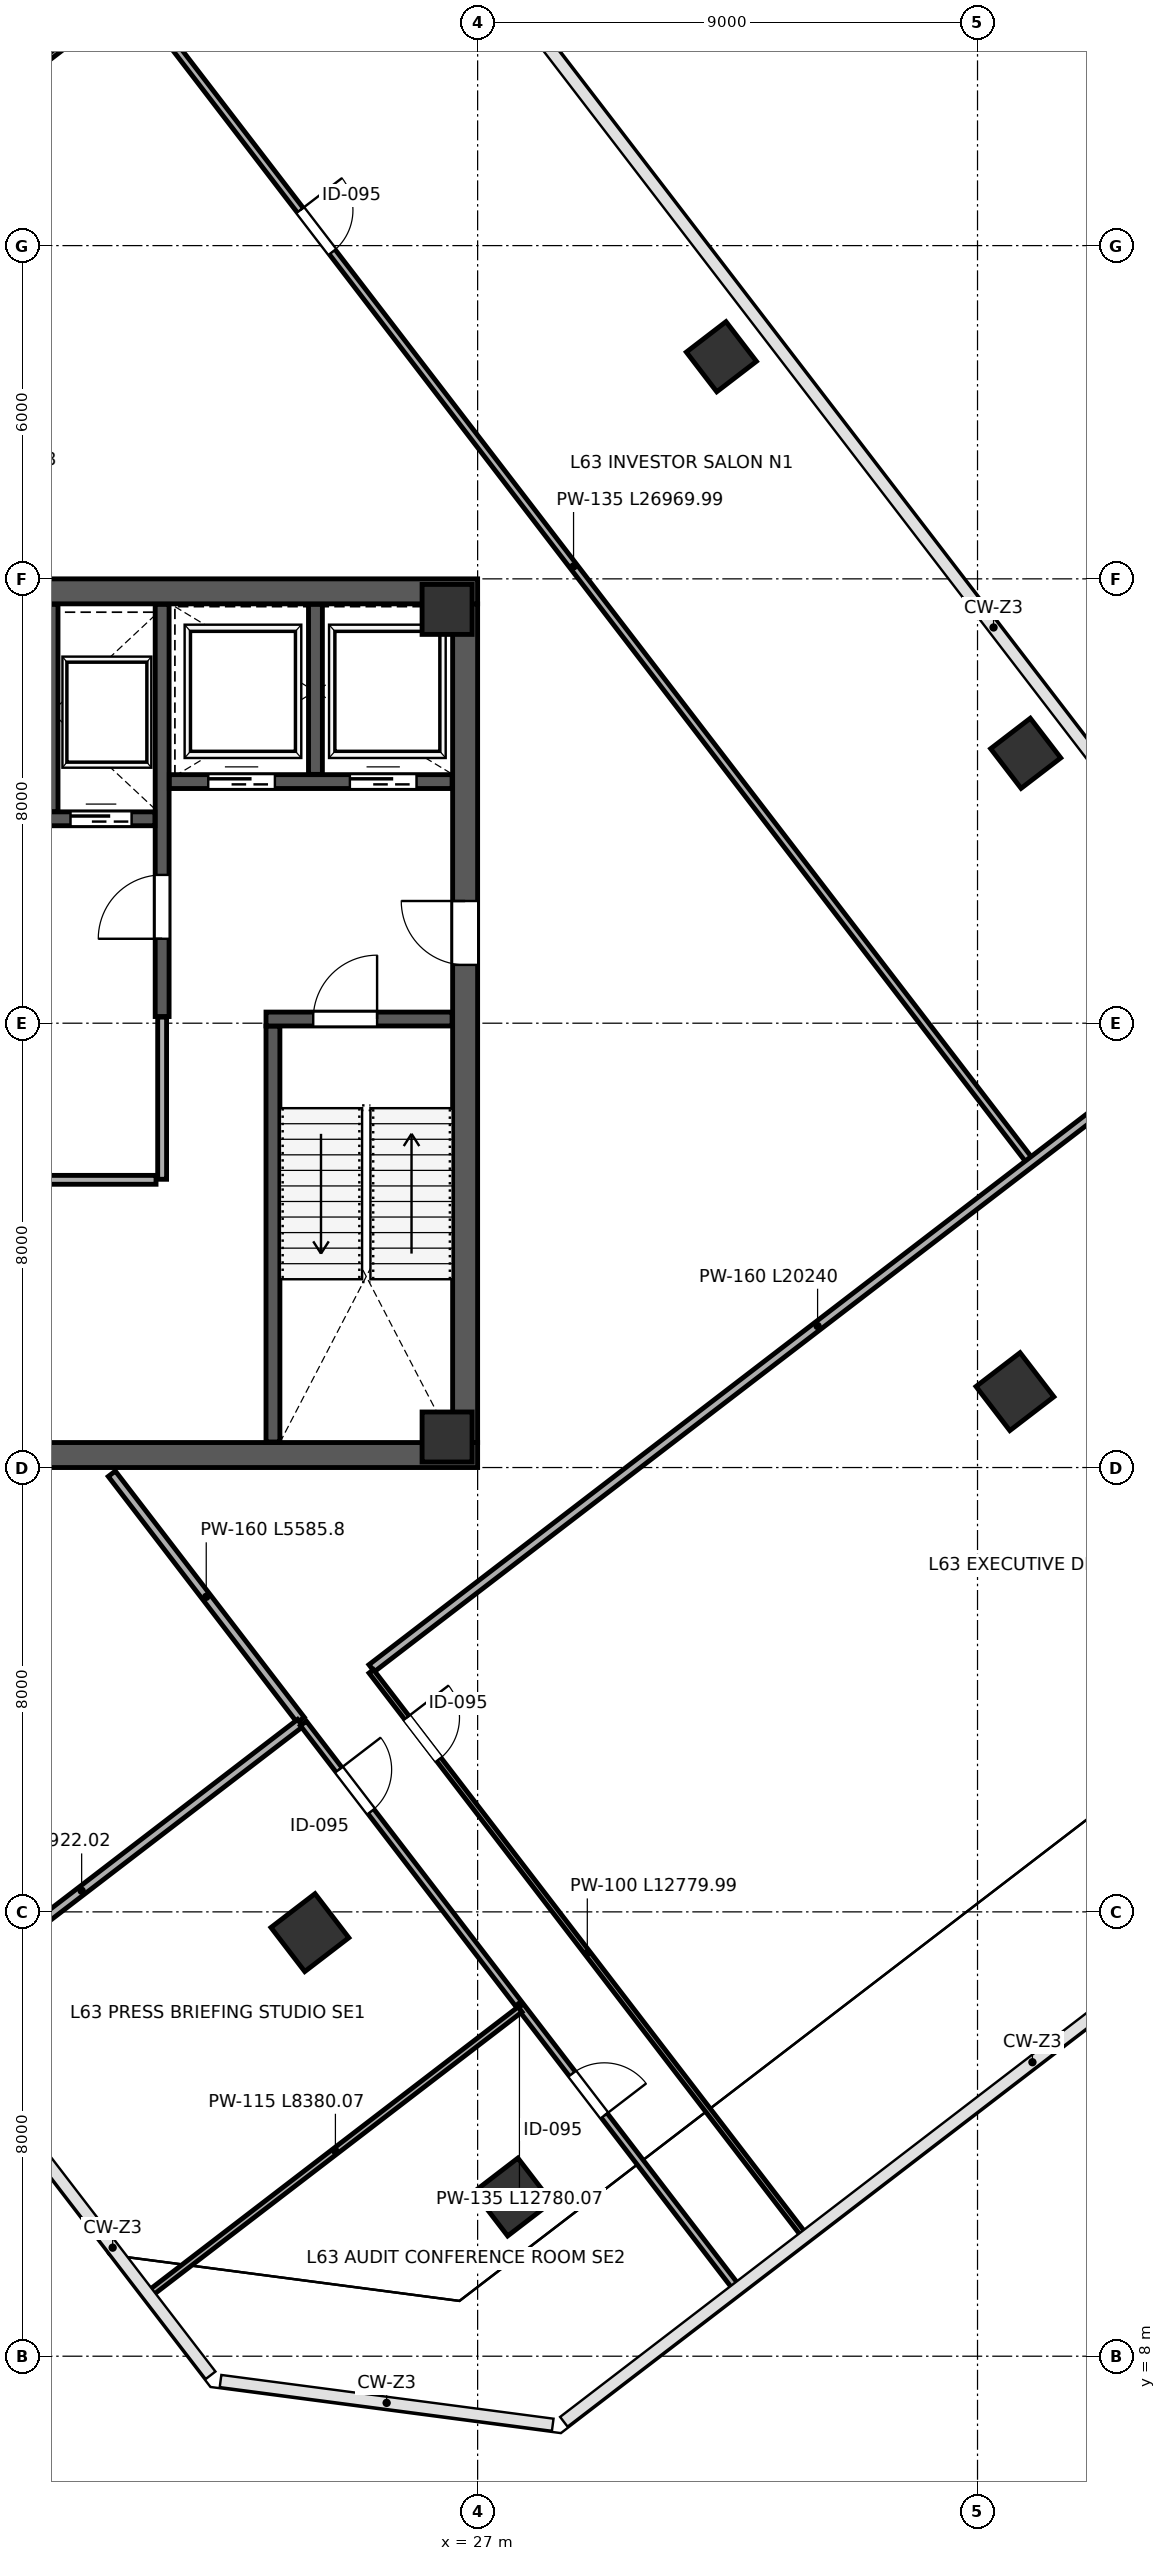
"""IFC4 building model, lengths in metres.
Left out: names, types, materials, properties, quantities, classifications, styles, units other than length and angle.
Written with IfcOpenShell. Run it as: python <this file> out.ifc"""

import sys

from ifc_helpers import new_model, si_unit, direction, frame, frame_2d, origin, origin_2d, place, context, subcontext, project, spatial, rectangle, extrude, source, transform, mapped, element, fill, save


model = new_model("IFC4")
c1 = context("Model", 3, precision=1e-05, world=origin(), true_north=direction((0.0, 1.0)))
c2 = subcontext(c1, "Body", "Model", "MODEL_VIEW")
j1 = project(units=[si_unit("LENGTHUNIT", "METRE"), si_unit("PLANEANGLEUNIT", "RADIAN")], contexts=[c1])
p1 = place(None, origin())
s1 = spatial("IfcSite", under=j1, at=p1, CompositionType="ELEMENT")
p2 = place(p1, origin())
s2 = spatial("IfcBuilding", under=s1, at=p2, CompositionType="ELEMENT")
p3 = place(p2, frame((0.0, 0.0, 279.4)))
s3 = spatial("IfcBuildingStorey", under=s2, at=p3, CompositionType="ELEMENT", Elevation=279.4)
m1 = source(origin(), c2, "Body", "SweptSolid", [
    extrude(rectangle(XDim=0.9, YDim=0.9, at=origin_2d()), origin(), (0.0, 0.0, 1.0), 4.199),
])
for number, where, z_axis, x_axis in (
    (1, (26.45, 24.55, 0.001), (0.0, 0.0, 1.0), (1.0, 0.0, 0.0)),
    (2, (26.45, 39.45, 0.001), (0.0, 0.0, 1.0), (1.0, 0.0, 0.0)),
):
    element("IfcColumn", number, at=place(p3, frame(where, z_axis=z_axis, x_axis=x_axis)), inside=s3, PredefinedType="COLUMN", context=c2, shape_type="MappedRepresentation", body=[
        mapped(m1, transform((0.0, 0.0, 0.0), scale=1.0)),
    ])
m2 = source(origin(), c2, "Body", "SweptSolid", [
    extrude(rectangle(XDim=0.9, YDim=0.9, at=origin_2d()), origin(), (0.0, 0.0, 1.0), 4.199),
])
for number, where, z_axis, x_axis in (
    (3, (31.389, 44.0, 0.001), (0.0, 0.0, 1.0), (-0.609, 0.793, 0.0)),
    (4, (36.867, 36.859, 0.001), (0.0, 0.0, 1.0), (-0.609, 0.793, 0.0)),
):
    element("IfcColumn", number, at=place(p3, frame(where, z_axis=z_axis, x_axis=x_axis)), inside=s3, PredefinedType="COLUMN", context=c2, shape_type="MappedRepresentation", body=[
        mapped(m2, transform((0.0, 0.0, 0.0), scale=1.0)),
    ])
m3 = source(origin(), c2, "Body", "SweptSolid", [
    extrude(rectangle(XDim=1.0, YDim=1.0, at=origin_2d()), origin(), (0.0, 0.0, 1.0), 4.199),
])
for number, where, z_axis, x_axis in (
    (5, (23.98, 15.626, 0.001), (0.0, 0.0, 1.0), (-0.609, 0.793, 0.0)),
    (6, (36.674, 25.366, 0.001), (0.0, 0.0, 1.0), (-0.609, 0.793, 0.0)),
):
    element("IfcColumn", number, at=place(p3, frame(where, z_axis=z_axis, x_axis=x_axis)), inside=s3, PredefinedType="COLUMN", context=c2, shape_type="MappedRepresentation", body=[
        mapped(m3, transform((0.0, 0.0, 0.0), scale=1.0)),
    ])
m4 = source(origin(), c2, "Body", "SweptSolid", [
    extrude(rectangle(XDim=1.0, YDim=1.0, at=origin_2d()), origin(), (0.0, 0.0, 1.0), 4.199),
])
p4 = place(p3, frame((27.633, 10.866, 0.001), z_axis=(0.0, 0.0, 1.0), x_axis=(-0.608761429009, 0.793353340291, 0.0)))
e7 = element("IfcColumn", 7, at=p4, inside=s3, PredefinedType="COLUMN", context=c2, shape_type="MappedRepresentation", body=[
    mapped(m4, transform((0.0, 0.0, 0.0), scale=1.0)),
])
p5 = place(p3, frame((26.775, 24.45, 0.0), z_axis=(0.0, 0.0, 1.0), x_axis=(0.0, 1.0, 0.0)))
e8 = element("IfcWall", 8, at=p5, inside=s3, PredefinedType="SHEAR", context=c2, shape_type="SweptSolid", body=[
    extrude(rectangle(XDim=15.1, YDim=0.45, at=frame_2d((7.55, 0.0))), origin(), (0.0, 0.0, 1.0), 3.96),
])
p6 = place(p5, frame((8.6, 0.0, 0.0)))
e9 = element("IfcOpeningElement", 9, at=p6, cuts=e8, PredefinedType="OPENING", context=c2, shape_type="SweptSolid", body=[
    extrude(rectangle(XDim=1.15, YDim=2.2, at=frame_2d((0.575, 1.1))), frame((0.0, 0.235, 0.0), z_axis=(0.0, -1.0, 0.0), x_axis=(1.0, 0.0, 0.0)), (0.0, 0.0, 1.0), 0.47),
])
for number, where, z_axis, x_axis in (
    (10, (9.0, 24.225, 0.0), (0.0, 0.0, 1.0), (1.0, 0.0, 0.0)),
    (11, (9.0, 39.775, 0.0), (0.0, 0.0, 1.0), (1.0, 0.0, 0.0)),
):
    element("IfcWall", number, at=place(p3, frame(where, z_axis=z_axis, x_axis=x_axis)), inside=s3, PredefinedType="SHEAR", context=c2, shape_type="SweptSolid", body=[
        extrude(rectangle(XDim=18.0, YDim=0.45, at=frame_2d((9.0, 0.0))), origin(), (0.0, 0.0, 1.0), 3.96),
    ])
p7 = place(p3, frame((23.315, 24.46, 0.0), z_axis=(0.0, 0.0, 1.0), x_axis=(0.0, 1.0, 0.0)))
e12 = element("IfcWall", 12, at=p7, inside=s3, PredefinedType="SHEAR", context=c2, shape_type="SweptSolid", body=[
    extrude(rectangle(XDim=7.49, YDim=0.25, at=frame_2d((3.745, 0.0))), origin(), (0.0, 0.0, 1.0), 3.96),
])
p8 = place(p3, frame((23.19, 32.075, 0.0), z_axis=(0.0, 0.0, 1.0), x_axis=(1.0, 0.0, 0.0)))
e13 = element("IfcWall", 13, at=p8, inside=s3, PredefinedType="SHEAR", context=c2, shape_type="SweptSolid", body=[
    extrude(rectangle(XDim=3.35, YDim=0.25, at=frame_2d((1.675, 0.0))), origin(), (0.0, 0.0, 1.0), 3.96),
])
p9 = place(p8, frame((0.85, 0.0, 0.0)))
e14 = element("IfcOpeningElement", 14, at=p9, cuts=e13, PredefinedType="OPENING", context=c2, shape_type="SweptSolid", body=[
    extrude(rectangle(XDim=1.15, YDim=2.2, at=frame_2d((0.575, 1.1))), frame((0.0, 0.135, 0.0), z_axis=(0.0, -1.0, 0.0), x_axis=(1.0, 0.0, 0.0)), (0.0, 0.0, 1.0), 0.27),
])
p10 = place(p3, frame((21.32, 32.12, 0.0), z_axis=(0.0, 0.0, 1.0), x_axis=(0.0, 1.0, 0.0)))
e15 = element("IfcWall", 15, at=p10, inside=s3, PredefinedType="SHEAR", context=c2, shape_type="SweptSolid", body=[
    extrude(rectangle(XDim=7.42, YDim=0.25, at=frame_2d((3.71, 0.0))), origin(), (0.0, 0.0, 1.0), 3.96),
])
p11 = place(p10, frame((1.4, 0.0, 0.0)))
e16 = element("IfcOpeningElement", 16, at=p11, cuts=e15, PredefinedType="OPENING", context=c2, shape_type="SweptSolid", body=[
    extrude(rectangle(XDim=1.15, YDim=2.2, at=frame_2d((0.575, 1.1))), frame((0.0, 0.135, 0.0), z_axis=(0.0, -1.0, 0.0), x_axis=(1.0, 0.0, 0.0)), (0.0, 0.0, 1.0), 0.27),
])
p12 = place(p3, frame((21.45, 36.35, 0.0), z_axis=(0.0, 0.0, 1.0), x_axis=(1.0, 0.0, 0.0)))
e17 = element("IfcWall", 17, at=p12, inside=s3, PredefinedType="SHEAR", context=c2, shape_type="SweptSolid", body=[
    extrude(rectangle(XDim=5.09, YDim=0.25, at=frame_2d((2.545, 0.0))), origin(), (0.0, 0.0, 1.0), 3.96),
])
p13 = place(p12, frame((0.7, 0.0, 0.0)))
e18 = element("IfcOpeningElement", 18, at=p13, cuts=e17, PredefinedType="OPENING", context=c2, shape_type="SweptSolid", body=[
    extrude(rectangle(XDim=1.2, YDim=2.2, at=frame_2d((0.6, 1.1))), frame((0.0, 0.135, 0.0), z_axis=(0.0, -1.0, 0.0), x_axis=(1.0, 0.0, 0.0)), (0.0, 0.0, 1.0), 0.27),
])
p14 = place(p12, frame((3.25, 0.0, 0.0)))
e19 = element("IfcOpeningElement", 19, at=p14, cuts=e17, PredefinedType="OPENING", context=c2, shape_type="SweptSolid", body=[
    extrude(rectangle(XDim=1.2, YDim=2.2, at=frame_2d((0.6, 1.1))), frame((0.0, 0.135, 0.0), z_axis=(0.0, -1.0, 0.0), x_axis=(1.0, 0.0, 0.0)), (0.0, 0.0, 1.0), 0.27),
])
p15 = place(p3, frame((24.08, 36.48, 0.0), z_axis=(0.0, 0.0, 1.0), x_axis=(0.0, 1.0, 0.0)))
e20 = element("IfcWall", 20, at=p15, inside=s3, PredefinedType="SHEAR", context=c2, shape_type="SweptSolid", body=[
    extrude(rectangle(XDim=3.06, YDim=0.25, at=frame_2d((1.53, 0.0))), origin(), (0.0, 0.0, 1.0), 3.96),
])
p16 = place(p3, frame((17.32, 35.68, 0.0), z_axis=(0.0, 0.0, 1.0), x_axis=(1.0, 0.0, 0.0)))
e21 = element("IfcWall", 21, at=p16, inside=s3, PredefinedType="SHEAR", context=c2, shape_type="SweptSolid", body=[
    extrude(rectangle(XDim=3.87, YDim=0.25, at=frame_2d((1.935, 0.0))), origin(), (0.0, 0.0, 1.0), 3.96),
])
p17 = place(p16, frame((0.45, 0.0, 0.0)))
e22 = element("IfcOpeningElement", 22, at=p17, cuts=e21, PredefinedType="OPENING", context=c2, shape_type="SweptSolid", body=[
    extrude(rectangle(XDim=1.1, YDim=2.2, at=frame_2d((0.55, 1.1))), frame((0.0, 0.135, 0.0), z_axis=(0.0, -1.0, 0.0), x_axis=(1.0, 0.0, 0.0)), (0.0, 0.0, 1.0), 0.27),
])
p18 = place(p16, frame((2.35, 0.0, 0.0)))
e23 = element("IfcOpeningElement", 23, at=p18, cuts=e21, PredefinedType="OPENING", context=c2, shape_type="SweptSolid", body=[
    extrude(rectangle(XDim=1.1, YDim=2.2, at=frame_2d((0.55, 1.1))), frame((0.0, 0.135, 0.0), z_axis=(0.0, -1.0, 0.0), x_axis=(1.0, 0.0, 0.0)), (0.0, 0.0, 1.0), 0.27),
])
p19 = place(p3, frame((19.32, 35.81, 0.0), z_axis=(0.0, 0.0, 1.0), x_axis=(0.0, 1.0, 0.0)))
e24 = element("IfcWall", 24, at=p19, inside=s3, PredefinedType="SHEAR", context=c2, shape_type="SweptSolid", body=[
    extrude(rectangle(XDim=3.73, YDim=0.25, at=frame_2d((1.865, 0.0))), origin(), (0.0, 0.0, 1.0), 3.96),
])
p20 = place(p3, frame((12.84, 29.18, 0.0), z_axis=(0.0, 0.0, 1.0), x_axis=(1.0, 0.0, 0.0)))
e25 = element("IfcWall", 25, at=p20, inside=s3, PredefinedType="PARTITIONING", context=c2, shape_type="SweptSolid", body=[
    extrude(rectangle(XDim=8.37, YDim=0.16, at=frame_2d((4.185, 0.0))), origin(), (0.0, 0.0, 1.0), 3.96),
])
p21 = place(p20, frame((2.6, 0.0, 0.0)))
e26 = element("IfcOpeningElement", 26, at=p21, cuts=e25, PredefinedType="OPENING", context=c2, shape_type="SweptSolid", body=[
    extrude(rectangle(XDim=0.9, YDim=2.15, at=frame_2d((0.45, 1.075))), frame((0.0, 0.09, 0.0), z_axis=(0.0, -1.0, 0.0), x_axis=(1.0, 0.0, 0.0)), (0.0, 0.0, 1.0), 0.18),
])
p22 = place(p3, frame((21.32, 29.19, 0.0), z_axis=(0.0, 0.0, 1.0), x_axis=(0.0, 1.0, 0.0)))
e27 = element("IfcWall", 27, at=p22, inside=s3, PredefinedType="PARTITIONING", context=c2, shape_type="SweptSolid", body=[
    extrude(rectangle(XDim=2.92, YDim=0.16, at=frame_2d((1.46, 0.0))), origin(), (0.0, 0.0, 1.0), 3.96),
])
p23 = place(p3, frame((20.414, 23.888, 0.0), z_axis=(0.0, 0.0, 1.0), x_axis=(0.608740736079, -0.793369218106, 0.0)))
e28 = element("IfcWall", 28, at=p23, inside=s3, PredefinedType="PARTITIONING", context=c2, shape_type="SweptSolid", body=[
    extrude(rectangle(XDim=5.585, YDim=0.16, at=frame_2d((2.793, 0.0))), origin(), (0.0, 0.0, 1.0), 3.96),
])
p24 = place(p3, frame((20.518, 50.922, 0.0), z_axis=(0.0, 0.0, 1.0), x_axis=(0.608759693778, -0.793354671778, 0.0)))
e29 = element("IfcWall", 29, at=p24, inside=s3, PredefinedType="PARTITIONING", context=c2, shape_type="SweptSolid", body=[
    extrude(rectangle(XDim=26.97, YDim=0.135, at=frame_2d((13.485, 0.0))), origin(), (0.0, 0.0, 1.0), 3.96),
])
p25 = place(p24, frame((5.4, 0.0, 0.0)))
e30 = element("IfcOpeningElement", 30, at=p25, cuts=e29, PredefinedType="OPENING", context=c2, shape_type="SweptSolid", body=[
    extrude(rectangle(XDim=0.95, YDim=2.15, at=frame_2d((0.475, 1.075))), frame((0.0, 0.078, 0.0), z_axis=(0.0, -1.0, 0.0), x_axis=(1.0, 0.0, 0.0)), (0.0, 0.0, 1.0), 0.155),
])
p26 = place(p3, frame((1.519, 35.764, 0.0), z_axis=(0.0, 0.0, 1.0), x_axis=(0.793353184068, 0.608761632602, 0.0)))
e31 = element("IfcWall", 31, at=p26, inside=s3, PredefinedType="PARTITIONING", context=c2, shape_type="SweptSolid", body=[
    extrude(rectangle(XDim=27.572, YDim=0.1, at=frame_2d((13.786, 0.0))), origin(), (0.0, 0.0, 1.0), 3.96),
])
p27 = place(p3, frame((25.092, 20.387, 0.0), z_axis=(0.0, 0.0, 1.0), x_axis=(0.793357014217, 0.608756641025, 0.0)))
e32 = element("IfcWall", 32, at=p27, inside=s3, PredefinedType="PARTITIONING", context=c2, shape_type="SweptSolid", body=[
    extrude(rectangle(XDim=20.24, YDim=0.16, at=frame_2d((10.12, 0.0))), origin(), (0.0, 0.0, 1.0), 3.195),
])
p28 = place(p3, frame((15.935, 13.361, 0.0), z_axis=(0.0, 0.0, 1.0), x_axis=(0.793355203048, 0.608759001409, 0.0)))
e33 = element("IfcWall", 33, at=p28, inside=s3, PredefinedType="PARTITIONING", context=c2, shape_type="SweptSolid", body=[
    extrude(rectangle(XDim=9.922, YDim=0.16, at=frame_2d((4.961, 0.0))), origin(), (0.0, 0.0, 1.0), 3.96),
])
p29 = place(p3, frame((25.085, 20.331, 0.0), z_axis=(0.0, 0.0, 1.0), x_axis=(0.608748325205, -0.793363395022, 0.0)))
e34 = element("IfcWall", 34, at=p29, inside=s3, PredefinedType="PARTITIONING", context=c2, shape_type="SweptSolid", body=[
    extrude(rectangle(XDim=12.78, YDim=0.1, at=frame_2d((6.39, 0.0))), origin(), (0.0, 0.0, 1.0), 3.253),
])
p30 = place(p29, frame((1.05, 0.0, 0.0)))
e35 = element("IfcOpeningElement", 35, at=p30, cuts=e34, PredefinedType="OPENING", context=c2, shape_type="SweptSolid", body=[
    extrude(rectangle(XDim=0.95, YDim=2.15, at=frame_2d((0.475, 1.075))), frame((0.0, 0.06, 0.0), z_axis=(0.0, -1.0, 0.0), x_axis=(1.0, 0.0, 0.0)), (0.0, 0.0, 1.0), 0.12),
])
p31 = place(p3, frame((23.863, 19.393, 0.0), z_axis=(0.0, 0.0, 1.0), x_axis=(0.608748325205, -0.793363395022, 0.0)))
e36 = element("IfcWall", 36, at=p31, inside=s3, PredefinedType="PARTITIONING", context=c2, shape_type="SweptSolid", body=[
    extrude(rectangle(XDim=12.78, YDim=0.135, at=frame_2d((6.39, 0.0))), origin(), (0.0, 0.0, 1.0), 3.253),
])
p32 = place(p31, frame((1.05, 0.0, 0.0)))
e37 = element("IfcOpeningElement", 37, at=p32, cuts=e36, PredefinedType="OPENING", context=c2, shape_type="SweptSolid", body=[
    extrude(rectangle(XDim=0.95, YDim=2.15, at=frame_2d((0.475, 1.075))), frame((0.0, 0.078, 0.0), z_axis=(0.0, -1.0, 0.0), x_axis=(1.0, 0.0, 0.0)), (0.0, 0.0, 1.0), 0.155),
])
p33 = place(p31, frame((7.95, 0.0, 0.0)))
e38 = element("IfcOpeningElement", 38, at=p33, cuts=e36, PredefinedType="OPENING", context=c2, shape_type="SweptSolid", body=[
    extrude(rectangle(XDim=0.95, YDim=2.15, at=frame_2d((0.475, 1.075))), frame((0.0, 0.078, 0.0), z_axis=(0.0, -1.0, 0.0), x_axis=(1.0, 0.0, 0.0)), (0.0, 0.0, 1.0), 0.155),
])
p34 = place(p3, frame((21.115, 9.142, 0.0), z_axis=(0.0, 0.0, 1.0), x_axis=(0.793351209169, 0.608764206331, 0.0)))
e39 = element("IfcWall", 39, at=p34, inside=s3, PredefinedType="PARTITIONING", context=c2, shape_type="SweptSolid", body=[
    extrude(rectangle(XDim=8.38, YDim=0.115, at=frame_2d((4.19, 0.0))), origin(), (0.0, 0.0, 1.0), 3.96),
])
m5 = source(origin(), c2, "Body", "SweptSolid", [
    extrude(rectangle(XDim=1.15, YDim=2.2, at=frame_2d((0.575, 1.1))), frame((0.0, 0.025, 0.0), z_axis=(0.0, -1.0, 0.0), x_axis=(1.0, 0.0, 0.0)), (0.0, 0.0, 1.0), 0.05),
])
p35 = place(p11, origin())
e40 = element("IfcDoor", 40, at=p35, inside=s3, OperationType="SINGLE_SWING_LEFT", PredefinedType="DOOR", context=c2, shape_type="MappedRepresentation", body=[
    mapped(m5, transform((0.0, 0.0, 0.0), scale=1.0)),
])
fill(e16, e40)
m6 = source(origin(), c2, "Body", "SweptSolid", [
    extrude(rectangle(XDim=1.15, YDim=2.2, at=frame_2d((0.575, 1.1))), frame((0.0, 0.025, 0.0), z_axis=(0.0, -1.0, 0.0), x_axis=(1.0, 0.0, 0.0)), (0.0, 0.0, 1.0), 0.05),
])
p36 = place(p9, origin())
e41 = element("IfcDoor", 41, at=p36, inside=s3, OperationType="SINGLE_SWING_RIGHT", PredefinedType="DOOR", context=c2, shape_type="MappedRepresentation", body=[
    mapped(m6, transform((0.0, 0.0, 0.0), scale=1.0)),
])
fill(e14, e41)
p37 = place(p6, origin())
e42 = element("IfcDoor", 42, at=p37, inside=s3, OperationType="SINGLE_SWING_RIGHT", PredefinedType="DOOR", context=c2, shape_type="MappedRepresentation", body=[
    mapped(m5, transform((0.0, 0.0, 0.0), scale=1.0)),
])
fill(e9, e42)
m7 = source(origin(), c2, "Body", "SweptSolid", [
    extrude(rectangle(XDim=1.1, YDim=2.2, at=frame_2d((0.55, 1.1))), frame((0.0, 0.025, 0.0), z_axis=(0.0, -1.0, 0.0), x_axis=(1.0, 0.0, 0.0)), (0.0, 0.0, 1.0), 0.05),
])
p38 = place(p18, origin())
e43 = element("IfcDoor", 43, at=p38, inside=s3, OperationType="SLIDING_TO_RIGHT", PredefinedType="DOOR", context=c2, shape_type="MappedRepresentation", body=[
    mapped(m7, transform((0.0, 0.0, 0.0), scale=1.0)),
])
fill(e23, e43)
m8 = source(origin(), c2, "Body", "SweptSolid", [
    extrude(rectangle(XDim=1.2, YDim=2.2, at=frame_2d((0.6, 1.1))), frame((0.0, 0.025, 0.0), z_axis=(0.0, -1.0, 0.0), x_axis=(1.0, 0.0, 0.0)), (0.0, 0.0, 1.0), 0.05),
])
p39 = place(p13, origin())
e44 = element("IfcDoor", 44, at=p39, inside=s3, OperationType="SLIDING_TO_LEFT", PredefinedType="DOOR", context=c2, shape_type="MappedRepresentation", body=[
    mapped(m8, transform((0.0, 0.0, 0.0), scale=1.0)),
])
fill(e18, e44)
p40 = place(p14, origin())
e45 = element("IfcDoor", 45, at=p40, inside=s3, OperationType="SLIDING_TO_RIGHT", PredefinedType="DOOR", context=c2, shape_type="MappedRepresentation", body=[
    mapped(m8, transform((0.0, 0.0, 0.0), scale=1.0)),
])
fill(e19, e45)
m9 = source(origin(), c2, "Body", "SweptSolid", [
    extrude(rectangle(XDim=0.95, YDim=2.15, at=frame_2d((0.475, 1.075))), frame((0.0, 0.025, 0.0), z_axis=(0.0, -1.0, 0.0), x_axis=(1.0, 0.0, 0.0)), (0.0, 0.0, 1.0), 0.05),
])
p41 = place(p25, origin())
e46 = element("IfcDoor", 46, at=p41, inside=s3, OperationType="SINGLE_SWING_LEFT", PredefinedType="DOOR", context=c2, shape_type="MappedRepresentation", body=[
    mapped(m9, transform((0.0, 0.0, 0.0), scale=1.0)),
])
fill(e30, e46)
p42 = place(p30, origin())
e47 = element("IfcDoor", 47, at=p42, inside=s3, OperationType="SINGLE_SWING_LEFT", PredefinedType="DOOR", context=c2, shape_type="MappedRepresentation", body=[
    mapped(m9, transform((0.0, 0.0, 0.0), scale=1.0)),
])
fill(e35, e47)
p43 = place(p32, origin())
e48 = element("IfcDoor", 48, at=p43, inside=s3, OperationType="SINGLE_SWING_LEFT", PredefinedType="DOOR", context=c2, shape_type="MappedRepresentation", body=[
    mapped(m9, transform((0.0, 0.0, 0.0), scale=1.0)),
])
fill(e37, e48)
p44 = place(p33, origin())
e49 = element("IfcDoor", 49, at=p44, inside=s3, OperationType="SINGLE_SWING_RIGHT", PredefinedType="DOOR", context=c2, shape_type="MappedRepresentation", body=[
    mapped(m9, transform((0.0, 0.0, 0.0), scale=1.0)),
])
fill(e38, e49)
save(model, sys.argv[1])
